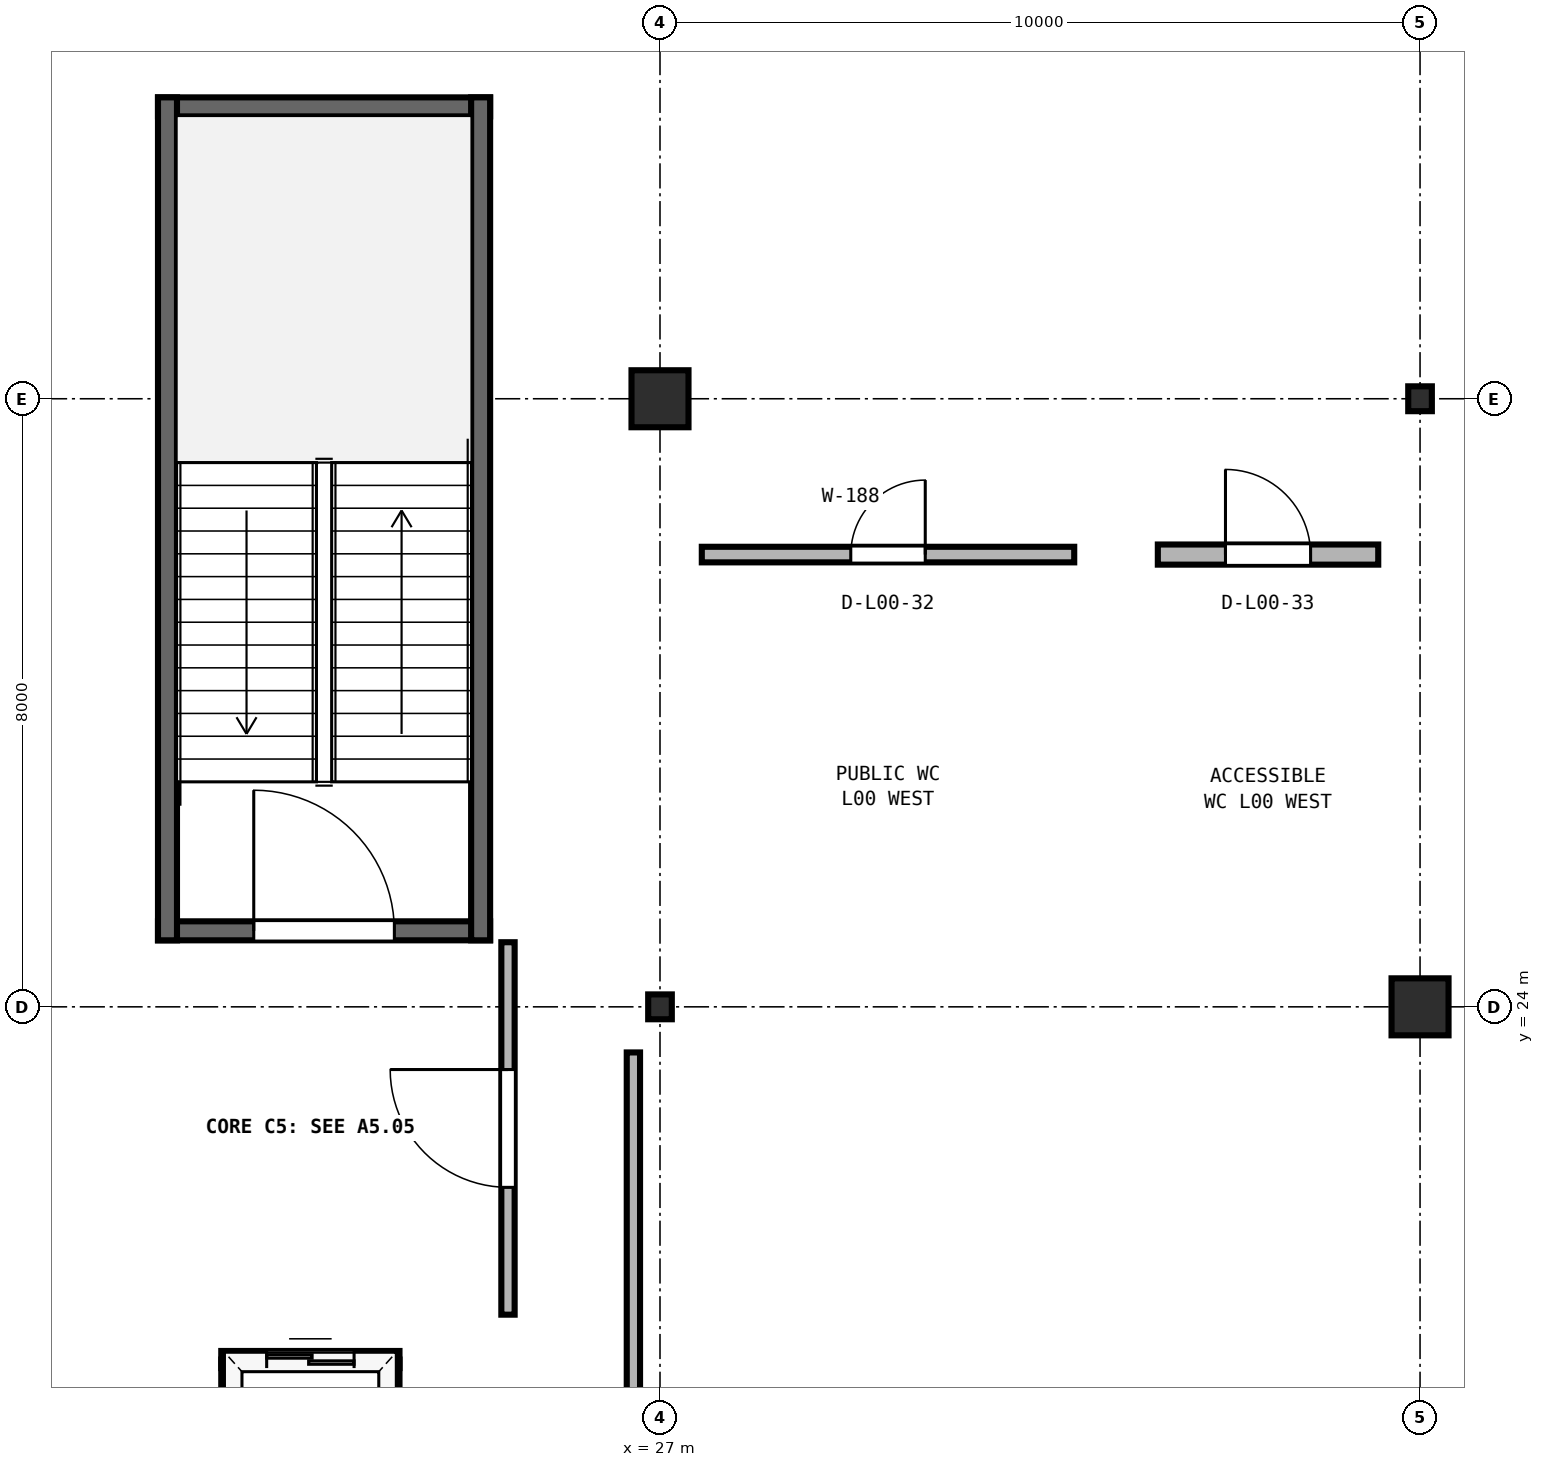
"""IFC4 building model, lengths in metres.
Left out: names, types, materials, properties, quantities, classifications, styles, units other than length and angle.
Written with IfcOpenShell. Run it as: python <this file> out.ifc"""

import sys

from ifc_helpers import new_model, si_unit, direction, frame, frame_2d, origin, origin_2d, place, context, subcontext, project, spatial, rectangle, i_section, extrude, element, fill, save


model = new_model("IFC4")
c1 = context("Model", 3, precision=1e-05, world=origin(), true_north=direction((0.0, 1.0)))
c2 = subcontext(c1, "Body", "Model", "MODEL_VIEW")
j1 = project(units=[si_unit("LENGTHUNIT", "METRE"), si_unit("PLANEANGLEUNIT", "RADIAN")], contexts=[c1])
p1 = place(None, origin())
s1 = spatial("IfcSite", under=j1, at=p1, CompositionType="ELEMENT")
p2 = place(p1, origin())
s2 = spatial("IfcBuilding", under=s1, at=p2, CompositionType="ELEMENT")
p3 = place(p2, origin())
s3 = spatial("IfcBuildingStorey", under=s2, at=p3, CompositionType="ELEMENT", Elevation=0.0)
p4 = place(p3, frame((27.0, 24.0, 0.0), z_axis=(0.0, 0.0, 1.0), x_axis=(1.0, 0.0, 0.0)))
e1 = element("IfcColumn", 1, at=p4, inside=s3, PredefinedType="COLUMN", context=c2, shape_type="SweptSolid", body=[
    extrude(i_section(OverallWidth=0.311, OverallDepth=0.327, WebThickness=0.016, FlangeThickness=0.025, FilletRadius=0.017, at=origin_2d()), origin(), (0.0, 0.0, 1.0), 5.12),
])
for number, where, z_axis, x_axis in (
    (2, (27.0, 32.0, 0.0), (0.0, 0.0, 1.0), (1.0, 0.0, 0.0)),
    (3, (37.0, 24.0, 0.0), (0.0, 0.0, 1.0), (1.0, 0.0, 0.0)),
):
    element("IfcColumn", number, at=place(p3, frame(where, z_axis=z_axis, x_axis=x_axis)), inside=s3, PredefinedType="COLUMN", context=c2, shape_type="SweptSolid", body=[
        extrude(rectangle(XDim=0.75, YDim=0.75, at=origin_2d()), origin(), (0.0, 0.0, 1.0), 5.12),
    ])
p5 = place(p3, frame((37.0, 32.0, 0.0), z_axis=(0.0, 0.0, 1.0), x_axis=(1.0, 0.0, 0.0)))
e4 = element("IfcColumn", 4, at=p5, inside=s3, PredefinedType="COLUMN", context=c2, shape_type="SweptSolid", body=[
    extrude(i_section(OverallWidth=0.311, OverallDepth=0.327, WebThickness=0.016, FlangeThickness=0.025, FilletRadius=0.017, at=origin_2d()), origin(), (0.0, 0.0, 1.0), 5.12),
])
p6 = place(p3, frame((20.395, 25.0, 0.0), z_axis=(0.0, 0.0, 1.0), x_axis=(1.0, 0.0, 0.0)))
e5 = element("IfcWall", 5, at=p6, inside=s3, PredefinedType="SHEAR", context=c2, shape_type="SweptSolid", body=[
    extrude(rectangle(XDim=4.37, YDim=0.25, at=frame_2d((2.185, 0.0))), origin(), (0.0, 0.0, 1.0), 5.12),
])
p7 = place(p6, frame((1.26, 0.0, 0.0)))
e6 = element("IfcOpeningElement", 6, at=p7, cuts=e5, PredefinedType="OPENING", context=c2, shape_type="SweptSolid", body=[
    extrude(rectangle(XDim=1.85, YDim=2.25, at=frame_2d((0.925, 1.125))), frame((0.0, 0.135, 0.0), z_axis=(0.0, -1.0, 0.0), x_axis=(1.0, 0.0, 0.0)), (0.0, 0.0, 1.0), 0.27),
])
p8 = place(p3, frame((20.395, 35.84, 0.0), z_axis=(0.0, 0.0, 1.0), x_axis=(1.0, 0.0, 0.0)))
e7 = element("IfcWall", 7, at=p8, inside=s3, PredefinedType="SHEAR", context=c2, shape_type="SweptSolid", body=[
    extrude(rectangle(XDim=4.37, YDim=0.25, at=frame_2d((2.185, 0.0))), origin(), (0.0, 0.0, 1.0), 5.12),
])
for number, where, z_axis, x_axis in (
    (8, (20.52, 24.875, 0.0), (0.0, 0.0, 1.0), (0.0, 1.0, 0.0)),
    (9, (24.64, 24.875, 0.0), (0.0, 0.0, 1.0), (0.0, 1.0, 0.0)),
):
    element("IfcWall", number, at=place(p3, frame(where, z_axis=z_axis, x_axis=x_axis)), inside=s3, PredefinedType="SHEAR", context=c2, shape_type="SweptSolid", body=[
        extrude(rectangle(XDim=11.09, YDim=0.25, at=frame_2d((5.545, 0.0))), origin(), (0.0, 0.0, 1.0), 5.12),
    ])
p9 = place(p3, frame((25.0, 19.95, 0.0), z_axis=(0.0, 0.0, 1.0), x_axis=(0.0, 1.0, 0.0)))
e10 = element("IfcWall", 10, at=p9, inside=s3, PredefinedType="PARTITIONING", context=c2, shape_type="SweptSolid", body=[
    extrude(rectangle(XDim=4.9, YDim=0.175, at=frame_2d((2.45, 0.0))), origin(), (0.0, 0.0, 1.0), 5.07),
])
p10 = place(p9, frame((1.675, 0.0, 0.0)))
e11 = element("IfcOpeningElement", 11, at=p10, cuts=e10, PredefinedType="OPENING", context=c2, shape_type="SweptSolid", body=[
    extrude(rectangle(XDim=1.55, YDim=2.22, at=frame_2d((0.775, 1.11))), frame((0.0, 0.097, 0.0), z_axis=(0.0, -1.0, 0.0), x_axis=(1.0, 0.0, 0.0)), (0.0, 0.0, 1.0), 0.195),
])
p11 = place(p3, frame((21.228, 19.36, 0.0), z_axis=(0.0, 0.0, 1.0), x_axis=(1.0, 0.0, 0.0)))
e12 = element("IfcWall", 12, at=p11, inside=s3, PredefinedType="SOLIDWALL", context=c2, shape_type="SweptSolid", body=[
    extrude(rectangle(XDim=2.345, YDim=0.225, at=frame_2d((1.172, 0.0))), origin(), (0.0, 0.0, 1.0), 5.07),
])
p12 = place(p11, frame((0.597, 0.0, 0.0)))
e13 = element("IfcOpeningElement", 13, at=p12, cuts=e12, PredefinedType="OPENING", context=c2, shape_type="SweptSolid", body=[
    extrude(rectangle(XDim=1.15, YDim=2.2, at=frame_2d((0.575, 1.1))), frame((0.0, 0.123, 0.0), z_axis=(0.0, -1.0, 0.0), x_axis=(1.0, 0.0, 0.0)), (0.0, 0.0, 1.0), 0.245),
])
for number, where, z_axis, x_axis in (
    (14, (21.34, 17.04, 0.0), (0.0, 0.0, 1.0), (0.0, 1.0, 0.0)),
    (15, (23.46, 17.04, 0.0), (0.0, 0.0, 1.0), (0.0, 1.0, 0.0)),
):
    element("IfcWall", number, at=place(p3, frame(where, z_axis=z_axis, x_axis=x_axis)), inside=s3, PredefinedType="SOLIDWALL", context=c2, shape_type="SweptSolid", body=[
        extrude(rectangle(XDim=2.32, YDim=0.225, at=frame_2d((1.16, 0.0))), origin(), (0.0, 0.0, 1.0), 5.07),
    ])
p13 = place(p3, frame((27.55, 29.95, 0.0), z_axis=(0.0, 0.0, 1.0), x_axis=(1.0, 0.0, 0.0)))
e16 = element("IfcWall", 16, at=p13, inside=s3, PredefinedType="PLUMBINGWALL", context=c2, shape_type="SweptSolid", body=[
    extrude(rectangle(XDim=4.9, YDim=0.205, at=frame_2d((2.45, 0.0))), origin(), (0.0, 0.0, 1.0), 5.07),
])
p14 = place(p13, frame((1.96, 0.0, 0.0)))
e17 = element("IfcOpeningElement", 17, at=p14, cuts=e16, PredefinedType="OPENING", context=c2, shape_type="SweptSolid", body=[
    extrude(rectangle(XDim=0.98, YDim=2.14, at=frame_2d((0.49, 1.07))), frame((0.0, 0.113, 0.0), z_axis=(0.0, -1.0, 0.0), x_axis=(1.0, 0.0, 0.0)), (0.0, 0.0, 1.0), 0.225),
])
p15 = place(p3, frame((33.55, 29.95, 0.0), z_axis=(0.0, 0.0, 1.0), x_axis=(1.0, 0.0, 0.0)))
e18 = element("IfcWall", 18, at=p15, inside=s3, PredefinedType="PLUMBINGWALL", context=c2, shape_type="SweptSolid", body=[
    extrude(rectangle(XDim=2.9, YDim=0.265, at=frame_2d((1.45, 0.0))), origin(), (0.0, 0.0, 1.0), 5.07),
])
p16 = place(p15, frame((0.89, 0.0, 0.0)))
e19 = element("IfcOpeningElement", 19, at=p16, cuts=e18, PredefinedType="OPENING", context=c2, shape_type="SweptSolid", body=[
    extrude(rectangle(XDim=1.12, YDim=2.16, at=frame_2d((0.56, 1.08))), frame((0.0, 0.142, 0.0), z_axis=(0.0, -1.0, 0.0), x_axis=(1.0, 0.0, 0.0)), (0.0, 0.0, 1.0), 0.285),
])
p17 = place(p3, frame((26.65, 8.35, 0.0), z_axis=(0.0, 0.0, 1.0), x_axis=(0.0, 1.0, 0.0)))
e20 = element("IfcWall", 20, at=p17, inside=s3, PredefinedType="PARTITIONING", context=c2, shape_type="SweptSolid", body=[
    extrude(rectangle(XDim=15.05, YDim=0.175, at=frame_2d((7.525, 0.0))), origin(), (0.0, 0.0, 1.0), 5.08),
])
p18 = place(p17, frame((3.0, 0.0, 0.0)))
e21 = element("IfcOpeningElement", 21, at=p18, cuts=e20, PredefinedType="OPENING", context=c2, shape_type="SweptSolid", body=[
    extrude(rectangle(XDim=1.55, YDim=2.22, at=frame_2d((0.775, 1.11))), frame((0.0, 0.097, 0.0), z_axis=(0.0, -1.0, 0.0), x_axis=(1.0, 0.0, 0.0)), (0.0, 0.0, 1.0), 0.195),
])
p19 = place(p7, origin())
e22 = element("IfcDoor", 22, at=p19, inside=s3, OperationType="SINGLE_SWING_LEFT", PredefinedType="DOOR", context=c2, shape_type="SweptSolid", body=[
    extrude(rectangle(XDim=1.85, YDim=2.25, at=frame_2d((0.925, 1.125))), frame((0.0, 0.025, 0.0), z_axis=(0.0, -1.0, 0.0), x_axis=(1.0, 0.0, 0.0)), (0.0, 0.0, 1.0), 0.05),
])
fill(e6, e22)
p20 = place(p10, origin())
e23 = element("IfcDoor", 23, at=p20, inside=s3, OperationType="SINGLE_SWING_RIGHT", PredefinedType="DOOR", context=c2, shape_type="SweptSolid", body=[
    extrude(rectangle(XDim=1.55, YDim=2.22, at=frame_2d((0.775, 1.11))), frame((0.0, 0.025, 0.0), z_axis=(0.0, -1.0, 0.0), x_axis=(1.0, 0.0, 0.0)), (0.0, 0.0, 1.0), 0.05),
])
fill(e11, e23)
p21 = place(p12, origin())
e24 = element("IfcDoor", 24, at=p21, inside=s3, OperationType="DOUBLE_DOOR_SLIDING", PredefinedType="DOOR", context=c2, shape_type="SweptSolid", body=[
    extrude(rectangle(XDim=1.15, YDim=2.2, at=frame_2d((0.575, 1.1))), frame((0.0, 0.025, 0.0), z_axis=(0.0, -1.0, 0.0), x_axis=(1.0, 0.0, 0.0)), (0.0, 0.0, 1.0), 0.05),
])
fill(e13, e24)
p22 = place(p14, origin())
e25 = element("IfcDoor", 25, at=p22, inside=s3, OperationType="SINGLE_SWING_RIGHT", PredefinedType="DOOR", context=c2, shape_type="SweptSolid", body=[
    extrude(rectangle(XDim=0.98, YDim=2.14, at=frame_2d((0.49, 1.07))), frame((0.0, 0.025, 0.0), z_axis=(0.0, -1.0, 0.0), x_axis=(1.0, 0.0, 0.0)), (0.0, 0.0, 1.0), 0.05),
])
fill(e17, e25)
p23 = place(p16, origin())
e26 = element("IfcDoor", 26, at=p23, inside=s3, OperationType="SINGLE_SWING_LEFT", PredefinedType="DOOR", context=c2, shape_type="SweptSolid", body=[
    extrude(rectangle(XDim=1.12, YDim=2.16, at=frame_2d((0.56, 1.08))), frame((0.0, 0.025, 0.0), z_axis=(0.0, -1.0, 0.0), x_axis=(1.0, 0.0, 0.0)), (0.0, 0.0, 1.0), 0.05),
])
fill(e19, e26)
save(model, sys.argv[1])
